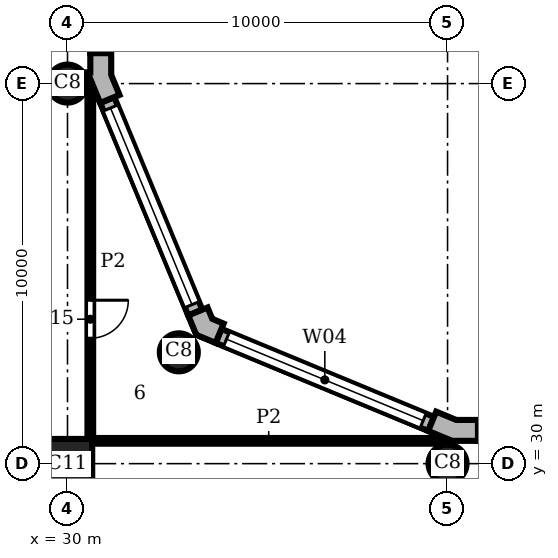
"""IFC4 building model, lengths in metres.
Left out: names, types, materials, properties, quantities, classifications, styles, units other than length and angle.
Written with IfcOpenShell. Run it as: python <this file> out.ifc"""

import sys

from ifc_helpers import new_model, si_unit, direction, frame, frame_2d, origin, origin_2d, place, context, subcontext, project, spatial, polyline, rectangle, circle, outline, extrude, element, fill, save


model = new_model("IFC4")
c1 = context("Model", 3, precision=1e-05, world=origin(), true_north=direction((0.0, 1.0)))
c2 = subcontext(c1, "Body", "Model", "MODEL_VIEW")
j1 = project(units=[si_unit("LENGTHUNIT", "METRE"), si_unit("PLANEANGLEUNIT", "RADIAN")], contexts=[c1])
p1 = place(None, origin())
s1 = spatial("IfcSite", under=j1, at=p1, CompositionType="ELEMENT")
p2 = place(p1, origin())
s2 = spatial("IfcBuilding", under=s1, at=p2, CompositionType="ELEMENT")
p3 = place(p2, frame((0.0, 0.0, 201.9)))
s3 = spatial("IfcBuildingStorey", under=s2, at=p3, CompositionType="ELEMENT", Elevation=201.9)
for number, where, z_axis, x_axis in (
    (1, (40.0, 30.0, 0.0), (0.0, 0.0, 1.0), (1.0, 0.0, 0.0)),
    (2, (32.929, 32.929, 0.0), (0.0, 0.0, 1.0), (1.0, 0.0, 0.0)),
    (3, (30.0, 40.0, 0.0), (0.0, 0.0, 1.0), (1.0, 0.0, 0.0)),
):
    element("IfcColumn", number, at=place(p3, frame(where, z_axis=z_axis, x_axis=x_axis)), inside=s3, PredefinedType="COLUMN", context=c2, shape_type="SweptSolid", body=[
        extrude(circle(Radius=0.5, at=origin_2d()), origin(), (0.0, 0.0, 1.0), 3.9),
    ])
p4 = place(p3, frame((30.0, 30.0, 0.0), z_axis=(0.0, 0.0, 1.0), x_axis=(1.0, 0.0, 0.0)))
e4 = element("IfcColumn", 4, at=p4, inside=s3, PredefinedType="COLUMN", context=c2, shape_type="SweptSolid", body=[
    extrude(rectangle(XDim=1.3, YDim=1.3, at=origin_2d()), origin(), (0.0, 0.0, 1.0), 3.9),
])
p5 = place(p3, origin())
e5 = element("IfcWall", 5, at=p5, inside=s3, PredefinedType="SOLIDWALL", context=c2, shape_type="SweptSolid", body=[
    extrude(outline(polyline([(40.8, 31.0), (40.8, 31.15), (40.229, 31.15), (39.701, 31.369), (39.644, 31.23), (39.49, 30.861), (40.119, 30.6), (40.8, 30.6), (40.8, 31.0)])), origin(), (0.0, 0.0, 1.0), 3.9),
])
e6 = element("IfcWall", 6, at=p5, inside=s3, PredefinedType="SOLIDWALL", context=c2, shape_type="SweptSolid", body=[
    extrude(outline(polyline([(34.051, 33.547), (34.108, 33.685), (33.809, 33.809), (33.685, 34.108), (33.547, 34.051), (33.177, 33.898), (33.388, 33.388), (33.898, 33.177), (34.051, 33.547)])), origin(), (0.0, 0.0, 1.0), 3.9),
])
e7 = element("IfcWall", 7, at=p5, inside=s3, PredefinedType="SOLIDWALL", context=c2, shape_type="SweptSolid", body=[
    extrude(outline(polyline([(30.62, 39.995), (30.62, 40.071), (30.861, 39.49), (31.23, 39.644), (31.369, 39.701), (31.15, 40.229), (31.15, 40.8), (31.0, 40.8), (30.6, 40.8), (30.6, 40.295), (30.5, 40.295), (30.5, 39.995), (30.62, 39.995)])), origin(), (0.0, 0.0, 1.0), 3.9),
])
p6 = place(p3, frame((59.2, 30.8, 0.0), z_axis=(0.0, 0.0, 1.0), x_axis=(-1.0, 0.0, 0.0)))
e8 = element("IfcWall", 8, at=p6, inside=s3, PredefinedType="SOLIDWALL", context=c2, shape_type="SweptSolid", body=[
    extrude(rectangle(XDim=18.4, YDim=0.4, at=frame_2d((9.2, 0.0))), origin(), (0.0, 0.0, 1.0), 3.9),
])
p7 = place(p6, frame((0.2, 0.0, 0.9)))
e9 = element("IfcOpeningElement", 9, at=p7, cuts=e8, PredefinedType="OPENING", context=c2, shape_type="SweptSolid", body=[
    extrude(rectangle(XDim=8.0, YDim=2.35, at=frame_2d((4.0, 1.175))), frame((0.0, 0.21, 0.0), z_axis=(0.0, -1.0, 0.0), x_axis=(1.0, 0.0, 0.0)), (0.0, 0.0, 1.0), 0.42),
])
p8 = place(p6, frame((10.2, 0.0, 0.9)))
e10 = element("IfcOpeningElement", 10, at=p8, cuts=e8, PredefinedType="OPENING", context=c2, shape_type="SweptSolid", body=[
    extrude(rectangle(XDim=8.0, YDim=2.35, at=frame_2d((4.0, 1.175))), frame((0.0, 0.21, 0.0), z_axis=(0.0, -1.0, 0.0), x_axis=(1.0, 0.0, 0.0)), (0.0, 0.0, 1.0), 0.42),
])
p9 = place(p3, frame((39.567, 31.045, 0.0), z_axis=(0.0, 0.0, 1.0), x_axis=(-0.923891000409, 0.382655745237, 0.0)))
e11 = element("IfcWall", 11, at=p9, inside=s3, PredefinedType="SOLIDWALL", context=c2, shape_type="SweptSolid", body=[
    extrude(rectangle(XDim=6.053, YDim=0.4, at=frame_2d((3.027, 0.0))), origin(), (0.0, 0.0, 1.0), 3.9),
])
p10 = place(p9, frame((0.227, 0.0, 0.9)))
e12 = element("IfcOpeningElement", 12, at=p10, cuts=e11, PredefinedType="OPENING", context=c2, shape_type="SweptSolid", body=[
    extrude(rectangle(XDim=5.6, YDim=2.35, at=frame_2d((2.8, 1.175))), frame((0.0, 0.21, 0.0), z_axis=(0.0, -1.0, 0.0), x_axis=(1.0, 0.0, 0.0)), (0.0, 0.0, 1.0), 0.42),
])
p11 = place(p3, frame((33.362, 33.974, 0.0), z_axis=(0.0, 0.0, 1.0), x_axis=(-0.382655745237, 0.923891000409, 0.0)))
e13 = element("IfcWall", 13, at=p11, inside=s3, PredefinedType="SOLIDWALL", context=c2, shape_type="SweptSolid", body=[
    extrude(rectangle(XDim=6.053, YDim=0.4, at=frame_2d((3.027, 0.0))), origin(), (0.0, 0.0, 1.0), 3.9),
])
p12 = place(p11, frame((0.227, 0.0, 0.9)))
e14 = element("IfcOpeningElement", 14, at=p12, cuts=e13, PredefinedType="OPENING", context=c2, shape_type="SweptSolid", body=[
    extrude(rectangle(XDim=5.6, YDim=2.35, at=frame_2d((2.8, 1.175))), frame((0.0, 0.21, 0.0), z_axis=(0.0, -1.0, 0.0), x_axis=(1.0, 0.0, 0.0)), (0.0, 0.0, 1.0), 0.42),
])
p13 = place(p3, frame((30.8, 40.8, 0.0), z_axis=(0.0, 0.0, 1.0), x_axis=(0.0, 1.0, 0.0)))
e15 = element("IfcWall", 15, at=p13, inside=s3, PredefinedType="SOLIDWALL", context=c2, shape_type="SweptSolid", body=[
    extrude(rectangle(XDim=18.4, YDim=0.4, at=frame_2d((9.2, 0.0))), origin(), (0.0, 0.0, 1.0), 3.9),
])
p14 = place(p13, frame((0.2, 0.0, 0.9)))
e16 = element("IfcOpeningElement", 16, at=p14, cuts=e15, PredefinedType="OPENING", context=c2, shape_type="SweptSolid", body=[
    extrude(rectangle(XDim=8.0, YDim=2.35, at=frame_2d((4.0, 1.175))), frame((0.0, 0.21, 0.0), z_axis=(0.0, -1.0, 0.0), x_axis=(1.0, 0.0, 0.0)), (0.0, 0.0, 1.0), 0.42),
])
p15 = place(p13, frame((10.2, 0.0, 0.9)))
e17 = element("IfcOpeningElement", 17, at=p15, cuts=e15, PredefinedType="OPENING", context=c2, shape_type="SweptSolid", body=[
    extrude(rectangle(XDim=8.0, YDim=2.35, at=frame_2d((4.0, 1.175))), frame((0.0, 0.21, 0.0), z_axis=(0.0, -1.0, 0.0), x_axis=(1.0, 0.0, 0.0)), (0.0, 0.0, 1.0), 0.42),
])
p16 = place(p3, frame((30.6, 30.65, 0.0), z_axis=(0.0, 0.0, 1.0), x_axis=(0.0, 1.0, 0.0)))
e18 = element("IfcWall", 18, at=p16, inside=s3, PredefinedType="PARTITIONING", context=c2, shape_type="SweptSolid", body=[
    extrude(rectangle(XDim=9.288, YDim=0.15, at=frame_2d((4.644, 0.0))), origin(), (0.0, 0.0, 1.0), 3.58),
])
p17 = place(p16, frame((2.65, 0.0, 0.0)))
e19 = element("IfcOpeningElement", 19, at=p17, cuts=e18, PredefinedType="OPENING", context=c2, shape_type="SweptSolid", body=[
    extrude(rectangle(XDim=1.0, YDim=2.1, at=frame_2d((0.5, 1.05))), frame((0.0, 0.085, 0.0), z_axis=(0.0, -1.0, 0.0), x_axis=(1.0, 0.0, 0.0)), (0.0, 0.0, 1.0), 0.17),
])
p18 = place(p3, frame((30.65, 30.6, 0.0), z_axis=(0.0, 0.0, 1.0), x_axis=(1.0, 0.0, 0.0)))
e20 = element("IfcWall", 20, at=p18, inside=s3, PredefinedType="PARTITIONING", context=c2, shape_type="SweptSolid", body=[
    extrude(rectangle(XDim=9.288, YDim=0.15, at=frame_2d((4.644, 0.0))), origin(), (0.0, 0.0, 1.0), 3.58),
])
p19 = place(p10, origin())
e21 = element("IfcWindow", 21, at=p19, inside=s3, PartitioningType="SINGLE_PANEL", PredefinedType="WINDOW", context=c2, shape_type="SweptSolid", body=[
    extrude(rectangle(XDim=5.6, YDim=2.35, at=frame_2d((2.8, 1.175))), frame((0.0, 0.16, 0.0), z_axis=(0.0, -1.0, 0.0), x_axis=(1.0, 0.0, 0.0)), (0.0, 0.0, 1.0), 0.06),
])
fill(e12, e21)
p20 = place(p12, origin())
e22 = element("IfcWindow", 22, at=p20, inside=s3, PartitioningType="SINGLE_PANEL", PredefinedType="WINDOW", context=c2, shape_type="SweptSolid", body=[
    extrude(rectangle(XDim=5.6, YDim=2.35, at=frame_2d((2.8, 1.175))), frame((0.0, 0.16, 0.0), z_axis=(0.0, -1.0, 0.0), x_axis=(1.0, 0.0, 0.0)), (0.0, 0.0, 1.0), 0.06),
])
fill(e14, e22)
p21 = place(p17, frame((1.0, 0.0, 0.0), z_axis=(0.0, 0.0, 1.0), x_axis=(-1.0, 0.0, 0.0)))
e23 = element("IfcDoor", 23, at=p21, inside=s3, OperationType="SINGLE_SWING_LEFT", PredefinedType="DOOR", context=c2, shape_type="SweptSolid", body=[
    extrude(rectangle(XDim=1.0, YDim=2.1, at=frame_2d((0.5, 1.05))), frame((0.0, 0.025, 0.0), z_axis=(0.0, -1.0, 0.0), x_axis=(1.0, 0.0, 0.0)), (0.0, 0.0, 1.0), 0.05),
])
fill(e19, e23)
save(model, sys.argv[1])
